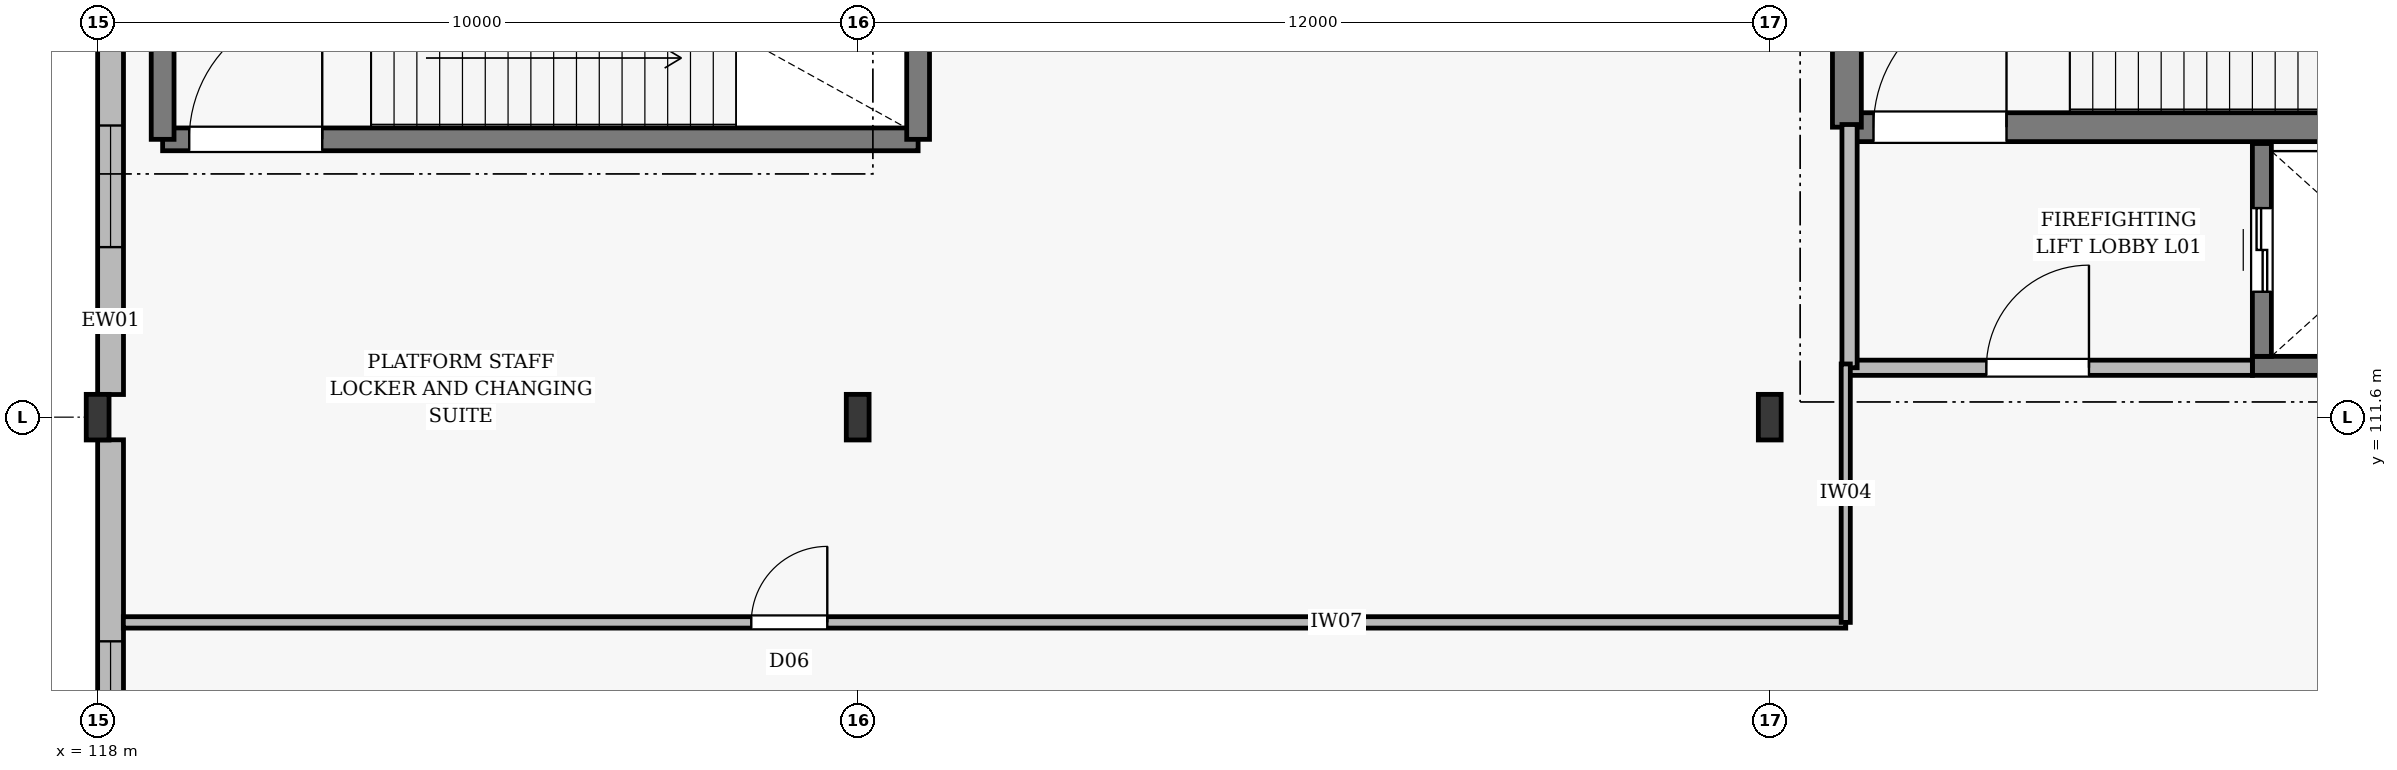
"""IFC4 building model, lengths in metres.
Left out: names, types, materials, properties, quantities, classifications, styles, units other than length and angle.
Written with IfcOpenShell. Run it as: python <this file> out.ifc"""

import sys

from ifc_helpers import new_model, si_unit, direction, frame, frame_2d, origin, origin_2d, place, context, subcontext, project, spatial, rectangle, i_section, extrude, element, fill, save


model = new_model("IFC4")
c1 = context("Model", 3, precision=1e-05, world=origin(), true_north=direction((0.0, 1.0)))
c2 = subcontext(c1, "Body", "Model", "MODEL_VIEW")
j1 = project(units=[si_unit("LENGTHUNIT", "METRE"), si_unit("PLANEANGLEUNIT", "RADIAN")], contexts=[c1])
p1 = place(None, origin())
s1 = spatial("IfcSite", under=j1, at=p1, CompositionType="ELEMENT")
p2 = place(p1, origin())
s2 = spatial("IfcBuilding", under=s1, at=p2, CompositionType="ELEMENT")
p3 = place(p2, frame((0.0, 0.0, 6.6)))
s3 = spatial("IfcBuildingStorey", under=s2, at=p3, CompositionType="ELEMENT", Elevation=6.6)
for number, where, z_axis, x_axis in (
    (1, (118.0, 111.6, 0.0), (0.0, 0.0, 1.0), (1.0, 0.0, 0.0)),
    (2, (128.0, 111.6, 0.0), (0.0, 0.0, 1.0), (1.0, 0.0, 0.0)),
    (3, (140.0, 111.6, 0.0), (0.0, 0.0, 1.0), (1.0, 0.0, 0.0)),
):
    element("IfcColumn", number, at=place(p3, frame(where, z_axis=z_axis, x_axis=x_axis)), inside=s3, PredefinedType="COLUMN", context=c2, shape_type="SweptSolid", body=[
        extrude(i_section(OverallWidth=0.3, OverallDepth=0.6, WebThickness=0.015, FlangeThickness=0.029, at=origin_2d()), origin(), (0.0, 0.0, 1.0), 6.0),
    ])
p4 = place(p3, frame((118.17, 101.098, 0.0), z_axis=(0.0, 0.0, 1.0), x_axis=(0.0, 1.0, 0.0)))
e4 = element("IfcWall", 4, at=p4, inside=s3, PredefinedType="STANDARD", context=c2, shape_type="SweptSolid", body=[
    extrude(rectangle(XDim=10.204, YDim=0.34, at=frame_2d((5.102, 0.0))), origin(), (0.0, 0.0, 1.0), 5.15),
])
p5 = place(p4, frame((0.951, 0.0, 0.75)))
e5 = element("IfcOpeningElement", 5, at=p5, cuts=e4, PredefinedType="OPENING", context=c2, shape_type="SweptSolid", body=[
    extrude(rectangle(XDim=1.2, YDim=1.8, at=frame_2d((0.6, 0.9))), frame((0.0, 0.182, 0.0), z_axis=(0.0, -1.0, 0.0), x_axis=(1.0, 0.0, 0.0)), (0.0, 0.0, 1.0), 0.364),
])
p6 = place(p4, frame((4.953, 0.0, 0.75)))
e6 = element("IfcOpeningElement", 6, at=p6, cuts=e4, PredefinedType="OPENING", context=c2, shape_type="SweptSolid", body=[
    extrude(rectangle(XDim=2.6, YDim=2.4, at=frame_2d((1.3, 1.2))), frame((0.0, 0.182, 0.0), z_axis=(0.0, -1.0, 0.0), x_axis=(1.0, 0.0, 0.0)), (0.0, 0.0, 1.0), 0.364),
])
p7 = place(p3, frame((118.17, 111.898, 0.0), z_axis=(0.0, 0.0, 1.0), x_axis=(0.0, 1.0, 0.0)))
e7 = element("IfcWall", 7, at=p7, inside=s3, PredefinedType="STANDARD", context=c2, shape_type="SweptSolid", body=[
    extrude(rectangle(XDim=10.154, YDim=0.34, at=frame_2d((5.077, 0.0))), origin(), (0.0, 0.0, 1.0), 5.15),
])
p8 = place(p7, frame((1.939, 0.0, 0.75)))
e8 = element("IfcOpeningElement", 8, at=p8, cuts=e7, PredefinedType="OPENING", context=c2, shape_type="SweptSolid", body=[
    extrude(rectangle(XDim=1.6, YDim=2.1, at=frame_2d((0.8, 1.05))), frame((0.0, 0.182, 0.0), z_axis=(0.0, -1.0, 0.0), x_axis=(1.0, 0.0, 0.0)), (0.0, 0.0, 1.0), 0.364),
])
p9 = place(p7, frame((6.616, 0.0, 0.75)))
e9 = element("IfcOpeningElement", 9, at=p9, cuts=e7, PredefinedType="OPENING", context=c2, shape_type="SweptSolid", body=[
    extrude(rectangle(XDim=1.6, YDim=2.1, at=frame_2d((0.8, 1.05))), frame((0.0, 0.182, 0.0), z_axis=(0.0, -1.0, 0.0), x_axis=(1.0, 0.0, 0.0)), (0.0, 0.0, 1.0), 0.364),
])
p10 = place(p3, frame((141.015, 115.415, 0.0), z_axis=(0.0, 0.0, 1.0), x_axis=(1.0, 0.0, 0.0)))
e10 = element("IfcWall", 10, at=p10, inside=s3, PredefinedType="SOLIDWALL", context=c2, shape_type="SweptSolid", body=[
    extrude(rectangle(XDim=10.17, YDim=0.38, at=frame_2d((5.085, 0.0))), origin(), (0.0, 0.0, 1.0), 6.0),
])
p11 = place(p10, frame((0.35, 0.0, 0.005)))
e11 = element("IfcOpeningElement", 11, at=p11, cuts=e10, PredefinedType="OPENING", context=c2, shape_type="SweptSolid", body=[
    extrude(rectangle(XDim=1.75, YDim=2.2, at=frame_2d((0.875, 1.1))), frame((0.0, 0.202, 0.0), z_axis=(0.0, -1.0, 0.0), x_axis=(1.0, 0.0, 0.0)), (0.0, 0.0, 1.0), 0.404),
])
p12 = place(p3, frame((141.015, 115.415, 0.0), z_axis=(0.0, 0.0, 1.0), x_axis=(0.0, 1.0, 0.0)))
e12 = element("IfcWall", 12, at=p12, inside=s3, PredefinedType="SOLIDWALL", context=c2, shape_type="SweptSolid", body=[
    extrude(rectangle(XDim=4.47, YDim=0.38, at=frame_2d((2.235, 0.0))), origin(), (0.0, 0.0, 1.0), 6.0),
])
p13 = place(p3, frame((118.855, 115.255, 0.0), z_axis=(0.0, 0.0, 1.0), x_axis=(1.0, 0.0, 0.0)))
e13 = element("IfcWall", 13, at=p13, inside=s3, PredefinedType="SOLIDWALL", context=c2, shape_type="SweptSolid", body=[
    extrude(rectangle(XDim=9.94, YDim=0.3, at=frame_2d((4.97, 0.0))), origin(), (0.0, 0.0, 1.0), 6.0),
])
p14 = place(p13, frame((0.35, 0.0, 0.005)))
e14 = element("IfcOpeningElement", 14, at=p14, cuts=e13, PredefinedType="OPENING", context=c2, shape_type="SweptSolid", body=[
    extrude(rectangle(XDim=1.75, YDim=2.2, at=frame_2d((0.875, 1.1))), frame((0.0, 0.162, 0.0), z_axis=(0.0, -1.0, 0.0), x_axis=(1.0, 0.0, 0.0)), (0.0, 0.0, 1.0), 0.324),
])
for number, where, z_axis, x_axis in (
    (15, (118.855, 115.255, 0.0), (0.0, 0.0, 1.0), (0.0, 1.0, 0.0)),
    (16, (128.795, 115.255, 0.0), (0.0, 0.0, 1.0), (0.0, 1.0, 0.0)),
):
    element("IfcWall", number, at=place(p3, frame(where, z_axis=z_axis, x_axis=x_axis)), inside=s3, PredefinedType="SOLIDWALL", context=c2, shape_type="SweptSolid", body=[
        extrude(rectangle(XDim=4.19, YDim=0.3, at=frame_2d((2.095, 0.0))), origin(), (0.0, 0.0, 1.0), 6.0),
    ])
p15 = place(p3, frame((146.35, 112.275, 0.0), z_axis=(0.0, 0.0, 1.0), x_axis=(1.0, 0.0, 0.0)))
e17 = element("IfcWall", 17, at=p15, inside=s3, PredefinedType="SOLIDWALL", context=c2, shape_type="SweptSolid", body=[
    extrude(rectangle(XDim=3.5, YDim=0.25, at=frame_2d((1.75, 0.0))), origin(), (0.0, 0.0, 1.0), 6.0),
])
p16 = place(p3, frame((146.475, 112.4, 0.0), z_axis=(0.0, 0.0, 1.0), x_axis=(0.0, 1.0, 0.0)))
e18 = element("IfcWall", 18, at=p16, inside=s3, PredefinedType="SOLIDWALL", context=c2, shape_type="SweptSolid", body=[
    extrude(rectangle(XDim=2.8, YDim=0.25, at=frame_2d((1.4, 0.0))), origin(), (0.0, 0.0, 1.0), 6.0),
])
p17 = place(p16, frame((0.85, 0.0, 0.005)))
e19 = element("IfcOpeningElement", 19, at=p17, cuts=e18, PredefinedType="OPENING", context=c2, shape_type="SweptSolid", body=[
    extrude(rectangle(XDim=1.1, YDim=2.15, at=frame_2d((0.55, 1.075))), frame((0.0, 0.137, 0.0), z_axis=(0.0, -1.0, 0.0), x_axis=(1.0, 0.0, 0.0)), (0.0, 0.0, 1.0), 0.274),
])
p18 = place(p3, frame((141.05, 112.25, 0.0), z_axis=(0.0, 0.0, 1.0), x_axis=(1.0, 0.0, 0.0)))
e20 = element("IfcWall", 20, at=p18, inside=s3, PredefinedType="PARTITIONING", context=c2, shape_type="SweptSolid", body=[
    extrude(rectangle(XDim=5.3, YDim=0.2, at=frame_2d((2.65, 0.0))), origin(), (0.0, 0.0, 1.0), 5.55),
])
p19 = place(p18, frame((1.8, 0.0, 0.005)))
e21 = element("IfcOpeningElement", 21, at=p19, cuts=e20, PredefinedType="OPENING", context=c2, shape_type="SweptSolid", body=[
    extrude(rectangle(XDim=1.35, YDim=2.15, at=frame_2d((0.675, 1.075))), frame((0.0, 0.112, 0.0), z_axis=(0.0, -1.0, 0.0), x_axis=(1.0, 0.0, 0.0)), (0.0, 0.0, 1.0), 0.224),
])
p20 = place(p3, frame((141.05, 112.25, 0.0), z_axis=(0.0, 0.0, 1.0), x_axis=(0.0, 1.0, 0.0)))
e22 = element("IfcWall", 22, at=p20, inside=s3, PredefinedType="PARTITIONING", context=c2, shape_type="SweptSolid", body=[
    extrude(rectangle(XDim=3.2, YDim=0.2, at=frame_2d((1.6, 0.0))), origin(), (0.0, 0.0, 1.0), 5.55),
])
p21 = place(p3, frame((118.338, 108.9, 0.0), z_axis=(0.0, 0.0, 1.0), x_axis=(1.0, 0.0, 0.0)))
e23 = element("IfcWall", 23, at=p21, inside=s3, PredefinedType="PARTITIONING", context=c2, shape_type="SweptSolid", body=[
    extrude(rectangle(XDim=22.662, YDim=0.15, at=frame_2d((11.331, 0.0))), origin(), (0.0, 0.0, 1.0), 5.29),
])
p22 = place(p21, frame((8.262, 0.0, 0.005)))
e24 = element("IfcOpeningElement", 24, at=p22, cuts=e23, PredefinedType="OPENING", context=c2, shape_type="SweptSolid", body=[
    extrude(rectangle(XDim=1.0, YDim=2.1, at=frame_2d((0.5, 1.05))), frame((0.0, 0.087, 0.0), z_axis=(0.0, -1.0, 0.0), x_axis=(1.0, 0.0, 0.0)), (0.0, 0.0, 1.0), 0.174),
])
p23 = place(p3, frame((141.0, 108.9, 0.0), z_axis=(0.0, 0.0, 1.0), x_axis=(0.0, 1.0, 0.0)))
e25 = element("IfcWall", 25, at=p23, inside=s3, PredefinedType="PARTITIONING", context=c2, shape_type="SweptSolid", body=[
    extrude(rectangle(XDim=3.4, YDim=0.12, at=frame_2d((1.7, 0.0))), origin(), (0.0, 0.0, 1.0), 5.14),
])
p24 = place(p6, origin())
e26 = element("IfcWindow", 26, at=p24, inside=s3, PartitioningType="DOUBLE_PANEL_VERTICAL", PredefinedType="WINDOW", context=c2, shape_type="SweptSolid", body=[
    extrude(rectangle(XDim=2.6, YDim=2.4, at=frame_2d((1.3, 1.2))), frame((0.0, 0.03, 0.0), z_axis=(0.0, -1.0, 0.0), x_axis=(1.0, 0.0, 0.0)), (0.0, 0.0, 1.0), 0.06),
])
fill(e6, e26)
p25 = place(p8, origin())
e27 = element("IfcWindow", 27, at=p25, inside=s3, PartitioningType="DOUBLE_PANEL_VERTICAL", PredefinedType="WINDOW", context=c2, shape_type="SweptSolid", body=[
    extrude(rectangle(XDim=1.6, YDim=2.1, at=frame_2d((0.8, 1.05))), frame((0.0, 0.03, 0.0), z_axis=(0.0, -1.0, 0.0), x_axis=(1.0, 0.0, 0.0)), (0.0, 0.0, 1.0), 0.06),
])
fill(e8, e27)
p26 = place(p11, origin())
e28 = element("IfcDoor", 28, at=p26, inside=s3, OperationType="SINGLE_SWING_RIGHT", PredefinedType="DOOR", context=c2, shape_type="SweptSolid", body=[
    extrude(rectangle(XDim=1.75, YDim=2.2, at=frame_2d((0.875, 1.1))), frame((0.0, 0.025, 0.0), z_axis=(0.0, -1.0, 0.0), x_axis=(1.0, 0.0, 0.0)), (0.0, 0.0, 1.0), 0.05),
])
fill(e11, e28)
p27 = place(p14, origin())
e29 = element("IfcDoor", 29, at=p27, inside=s3, OperationType="SINGLE_SWING_RIGHT", PredefinedType="DOOR", context=c2, shape_type="SweptSolid", body=[
    extrude(rectangle(XDim=1.75, YDim=2.2, at=frame_2d((0.875, 1.1))), frame((0.0, 0.025, 0.0), z_axis=(0.0, -1.0, 0.0), x_axis=(1.0, 0.0, 0.0)), (0.0, 0.0, 1.0), 0.05),
])
fill(e14, e29)
p28 = place(p17, origin())
e30 = element("IfcDoor", 30, at=p28, inside=s3, OperationType="SLIDING_TO_LEFT", PredefinedType="DOOR", context=c2, shape_type="SweptSolid", body=[
    extrude(rectangle(XDim=1.1, YDim=2.15, at=frame_2d((0.55, 1.075))), frame((0.0, 0.025, 0.0), z_axis=(0.0, -1.0, 0.0), x_axis=(1.0, 0.0, 0.0)), (0.0, 0.0, 1.0), 0.05),
])
fill(e19, e30)
p29 = place(p19, origin())
e31 = element("IfcDoor", 31, at=p29, inside=s3, OperationType="SINGLE_SWING_RIGHT", PredefinedType="DOOR", context=c2, shape_type="SweptSolid", body=[
    extrude(rectangle(XDim=1.35, YDim=2.15, at=frame_2d((0.675, 1.075))), frame((0.0, 0.025, 0.0), z_axis=(0.0, -1.0, 0.0), x_axis=(1.0, 0.0, 0.0)), (0.0, 0.0, 1.0), 0.05),
])
fill(e21, e31)
p30 = place(p22, origin())
e32 = element("IfcDoor", 32, at=p30, inside=s3, OperationType="SINGLE_SWING_RIGHT", PredefinedType="DOOR", context=c2, shape_type="SweptSolid", body=[
    extrude(rectangle(XDim=1.0, YDim=2.1, at=frame_2d((0.5, 1.05))), frame((0.0, 0.025, 0.0), z_axis=(0.0, -1.0, 0.0), x_axis=(1.0, 0.0, 0.0)), (0.0, 0.0, 1.0), 0.05),
])
fill(e24, e32)
save(model, sys.argv[1])
